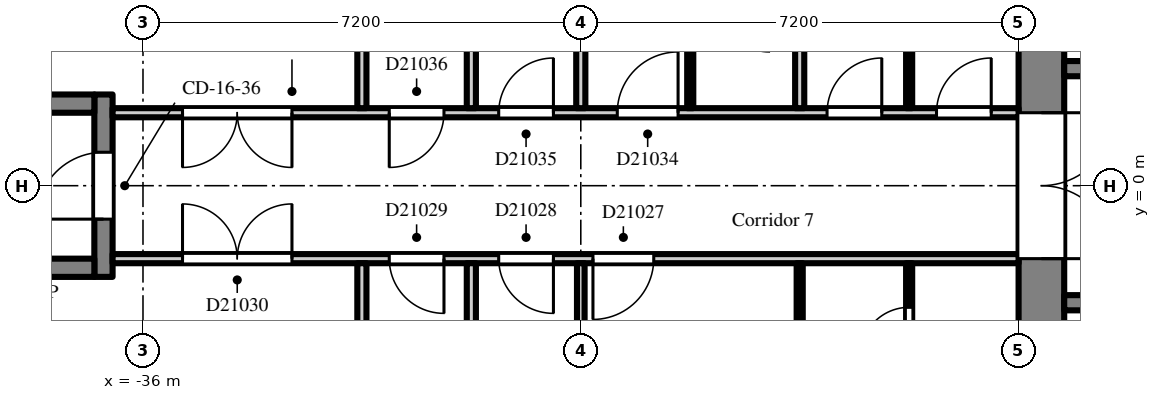
"""IFC4 building model, lengths in metres.
Left out: names, types, materials, properties, quantities, classifications, styles, units other than length and angle.
Written with IfcOpenShell. Run it as: python <this file> out.ifc"""

import sys

from ifc_helpers import new_model, si_unit, direction, frame, frame_2d, origin, place, context, subcontext, project, spatial, rectangle, extrude, element, fill, save


model = new_model("IFC4")
c1 = context("Model", 3, precision=1e-05, world=origin(), true_north=direction((0.0, 1.0)))
c2 = subcontext(c1, "Body", "Model", "MODEL_VIEW")
j1 = project(units=[si_unit("LENGTHUNIT", "METRE"), si_unit("PLANEANGLEUNIT", "RADIAN")], contexts=[c1])
p1 = place(None, origin())
s1 = spatial("IfcSite", under=j1, at=p1, CompositionType="ELEMENT")
p2 = place(p1, origin())
s2 = spatial("IfcBuilding", under=s1, at=p2, CompositionType="ELEMENT")
p3 = place(p2, frame((0.0, 0.0, 147.3)))
s3 = spatial("IfcBuildingStorey", under=s2, at=p3, CompositionType="ELEMENT", Elevation=147.3)
p4 = place(p3, frame((-21.225, -7.2, 0.0), z_axis=(0.0, 0.0, 1.0), x_axis=(0.0, 1.0, 0.0)))
e1 = element("IfcWall", 1, at=p4, inside=s3, PredefinedType="SHEAR", context=c2, shape_type="SweptSolid", body=[
    extrude(rectangle(XDim=14.4, YDim=0.75, at=frame_2d((7.2, 0.0))), origin(), (0.0, 0.0, 1.0), 2.6),
])
p5 = place(p4, frame((6.0, 0.0, 0.0)))
e2 = element("IfcOpeningElement", 2, at=p5, cuts=e1, PredefinedType="OPENING", context=c2, shape_type="SweptSolid", body=[
    extrude(rectangle(XDim=2.4, YDim=2.2, at=frame_2d((1.2, 1.1))), frame((0.0, 0.385, 0.0), z_axis=(0.0, -1.0, 0.0), x_axis=(1.0, 0.0, 0.0)), (0.0, 0.0, 1.0), 0.77),
])
p6 = place(p3, frame((-7.9, 1.925, 0.0), z_axis=(0.0, 0.0, 1.0), x_axis=(-1.0, 0.0, 0.0)))
e3 = element("IfcWall", 3, at=p6, inside=s3, PredefinedType="SHEAR", context=c2, shape_type="SweptSolid", body=[
    extrude(rectangle(XDim=12.95, YDim=0.25, at=frame_2d((6.475, 0.0))), origin(), (0.0, 0.0, 1.0), 2.6),
])
p7 = place(p6, frame((4.825, 0.0, 0.0)))
e4 = element("IfcOpeningElement", 4, at=p7, cuts=e3, PredefinedType="OPENING", context=c2, shape_type="SweptSolid", body=[
    extrude(rectangle(XDim=1.1, YDim=2.1, at=frame_2d((0.55, 1.05))), frame((0.0, 0.135, 0.0), z_axis=(0.0, -1.0, 0.0), x_axis=(1.0, 0.0, 0.0)), (0.0, 0.0, 1.0), 0.27),
])
p8 = place(p6, frame((7.025, 0.0, 0.0)))
e5 = element("IfcOpeningElement", 5, at=p8, cuts=e3, PredefinedType="OPENING", context=c2, shape_type="SweptSolid", body=[
    extrude(rectangle(XDim=1.1, YDim=2.1, at=frame_2d((0.55, 1.05))), frame((0.0, 0.135, 0.0), z_axis=(0.0, -1.0, 0.0), x_axis=(1.0, 0.0, 0.0)), (0.0, 0.0, 1.0), 0.27),
])
p9 = place(p6, frame((9.225, 0.0, 0.0)))
e6 = element("IfcOpeningElement", 6, at=p9, cuts=e3, PredefinedType="OPENING", context=c2, shape_type="SweptSolid", body=[
    extrude(rectangle(XDim=1.1, YDim=2.1, at=frame_2d((0.55, 1.05))), frame((0.0, 0.135, 0.0), z_axis=(0.0, -1.0, 0.0), x_axis=(1.0, 0.0, 0.0)), (0.0, 0.0, 1.0), 0.27),
])
p10 = place(p6, frame((0.525, 0.0, 0.0)))
e7 = element("IfcOpeningElement", 7, at=p10, cuts=e3, PredefinedType="OPENING", context=c2, shape_type="SweptSolid", body=[
    extrude(rectangle(XDim=0.9, YDim=2.1, at=frame_2d((0.45, 1.05))), frame((0.0, 0.135, 0.0), z_axis=(0.0, -1.0, 0.0), x_axis=(1.0, 0.0, 0.0)), (0.0, 0.0, 1.0), 0.27),
])
p11 = place(p6, frame((2.625, 0.0, 0.0)))
e8 = element("IfcOpeningElement", 8, at=p11, cuts=e3, PredefinedType="OPENING", context=c2, shape_type="SweptSolid", body=[
    extrude(rectangle(XDim=1.1, YDim=2.1, at=frame_2d((0.55, 1.05))), frame((0.0, 0.135, 0.0), z_axis=(0.0, -1.0, 0.0), x_axis=(1.0, 0.0, 0.0)), (0.0, 0.0, 1.0), 0.27),
])
p12 = place(p6, frame((11.525, 0.0, 0.0)))
e9 = element("IfcOpeningElement", 9, at=p12, cuts=e3, PredefinedType="OPENING", context=c2, shape_type="SweptSolid", body=[
    extrude(rectangle(XDim=0.9, YDim=2.1, at=frame_2d((0.45, 1.05))), frame((0.0, 0.135, 0.0), z_axis=(0.0, -1.0, 0.0), x_axis=(1.0, 0.0, 0.0)), (0.0, 0.0, 1.0), 0.27),
])
p13 = place(p3, frame((-7.9, -1.925, 0.0), z_axis=(0.0, 0.0, 1.0), x_axis=(-1.0, 0.0, 0.0)))
e10 = element("IfcWall", 10, at=p13, inside=s3, PredefinedType="SHEAR", context=c2, shape_type="SweptSolid", body=[
    extrude(rectangle(XDim=12.95, YDim=0.25, at=frame_2d((6.475, 0.0))), origin(), (0.0, 0.0, 1.0), 2.6),
])
p14 = place(p13, frame((0.525, 0.0, 0.0)))
e11 = element("IfcOpeningElement", 11, at=p14, cuts=e10, PredefinedType="OPENING", context=c2, shape_type="SweptSolid", body=[
    extrude(rectangle(XDim=0.9, YDim=2.1, at=frame_2d((0.45, 1.05))), frame((0.0, 0.135, 0.0), z_axis=(0.0, -1.0, 0.0), x_axis=(1.0, 0.0, 0.0)), (0.0, 0.0, 1.0), 0.27),
])
p15 = place(p13, frame((2.625, 0.0, 0.0)))
e12 = element("IfcOpeningElement", 12, at=p15, cuts=e10, PredefinedType="OPENING", context=c2, shape_type="SweptSolid", body=[
    extrude(rectangle(XDim=1.1, YDim=2.1, at=frame_2d((0.55, 1.05))), frame((0.0, 0.135, 0.0), z_axis=(0.0, -1.0, 0.0), x_axis=(1.0, 0.0, 0.0)), (0.0, 0.0, 1.0), 0.27),
])
p16 = place(p13, frame((4.925, 0.0, 0.0)))
e13 = element("IfcOpeningElement", 13, at=p16, cuts=e10, PredefinedType="OPENING", context=c2, shape_type="SweptSolid", body=[
    extrude(rectangle(XDim=0.9, YDim=2.1, at=frame_2d((0.45, 1.05))), frame((0.0, 0.135, 0.0), z_axis=(0.0, -1.0, 0.0), x_axis=(1.0, 0.0, 0.0)), (0.0, 0.0, 1.0), 0.27),
])
p17 = place(p13, frame((8.225, 0.0, 0.0)))
e14 = element("IfcOpeningElement", 14, at=p17, cuts=e10, PredefinedType="OPENING", context=c2, shape_type="SweptSolid", body=[
    extrude(rectangle(XDim=0.9, YDim=2.1, at=frame_2d((0.45, 1.05))), frame((0.0, 0.135, 0.0), z_axis=(0.0, -1.0, 0.0), x_axis=(1.0, 0.0, 0.0)), (0.0, 0.0, 1.0), 0.27),
])
p18 = place(p13, frame((11.525, 0.0, 0.0)))
e15 = element("IfcOpeningElement", 15, at=p18, cuts=e10, PredefinedType="OPENING", context=c2, shape_type="SweptSolid", body=[
    extrude(rectangle(XDim=0.9, YDim=2.1, at=frame_2d((0.45, 1.05))), frame((0.0, 0.135, 0.0), z_axis=(0.0, -1.0, 0.0), x_axis=(1.0, 0.0, 0.0)), (0.0, 0.0, 1.0), 0.27),
])
p19 = place(p3, frame((-36.65, -1.5, 0.0), z_axis=(0.0, 0.0, 1.0), x_axis=(0.0, 1.0, 0.0)))
e16 = element("IfcWall", 16, at=p19, inside=s3, PredefinedType="SHEAR", context=c2, shape_type="SweptSolid", body=[
    extrude(rectangle(XDim=3.0, YDim=0.3, at=frame_2d((1.5, 0.0))), origin(), (0.0, 0.0, 1.0), 2.6),
])
p20 = place(p19, frame((0.95, 0.0, 0.0)))
e17 = element("IfcOpeningElement", 17, at=p20, cuts=e16, PredefinedType="OPENING", context=c2, shape_type="SweptSolid", body=[
    extrude(rectangle(XDim=1.1, YDim=2.1, at=frame_2d((0.55, 1.05))), frame((0.0, 0.16, 0.0), z_axis=(0.0, -1.0, 0.0), x_axis=(1.0, 0.0, 0.0)), (0.0, 0.0, 1.0), 0.32),
])
for number, where, z_axis, x_axis in (
    (18, (-36.8, -1.35, 0.0), (0.0, 0.0, 1.0), (-1.0, 0.0, 0.0)),
    (19, (-36.8, 1.35, 0.0), (0.0, 0.0, 1.0), (-1.0, 0.0, 0.0)),
):
    element("IfcWall", number, at=place(p3, frame(where, z_axis=z_axis, x_axis=x_axis)), inside=s3, PredefinedType="SHEAR", context=c2, shape_type="SweptSolid", body=[
        extrude(rectangle(XDim=5.8, YDim=0.3, at=frame_2d((2.9, 0.0))), origin(), (0.0, 0.0, 1.0), 2.6),
    ])
p21 = place(p3, frame((-36.5, -1.2, 0.0), z_axis=(0.0, 0.0, 1.0), x_axis=(1.0, 0.0, 0.0)))
e20 = element("IfcWall", 20, at=p21, inside=s3, PredefinedType="PARTITIONING", context=c2, shape_type="SweptSolid", body=[
    extrude(rectangle(XDim=14.9, YDim=0.15, at=frame_2d((7.45, 0.0))), origin(), (0.0, 0.0, 1.0), 2.6),
])
p22 = place(p21, frame((7.9, 0.0, 0.0)))
e21 = element("IfcOpeningElement", 21, at=p22, cuts=e20, PredefinedType="OPENING", context=c2, shape_type="SweptSolid", body=[
    extrude(rectangle(XDim=1.0, YDim=2.1, at=frame_2d((0.5, 1.05))), frame((0.0, 0.085, 0.0), z_axis=(0.0, -1.0, 0.0), x_axis=(1.0, 0.0, 0.0)), (0.0, 0.0, 1.0), 0.17),
])
p23 = place(p21, frame((6.35, 0.0, 0.0)))
e22 = element("IfcOpeningElement", 22, at=p23, cuts=e20, PredefinedType="OPENING", context=c2, shape_type="SweptSolid", body=[
    extrude(rectangle(XDim=0.9, YDim=2.1, at=frame_2d((0.45, 1.05))), frame((0.0, 0.085, 0.0), z_axis=(0.0, -1.0, 0.0), x_axis=(1.0, 0.0, 0.0)), (0.0, 0.0, 1.0), 0.17),
])
p24 = place(p21, frame((4.55, 0.0, 0.0)))
e23 = element("IfcOpeningElement", 23, at=p24, cuts=e20, PredefinedType="OPENING", context=c2, shape_type="SweptSolid", body=[
    extrude(rectangle(XDim=0.9, YDim=2.1, at=frame_2d((0.45, 1.05))), frame((0.0, 0.085, 0.0), z_axis=(0.0, -1.0, 0.0), x_axis=(1.0, 0.0, 0.0)), (0.0, 0.0, 1.0), 0.17),
])
p25 = place(p21, frame((1.15, 0.0, 0.0)))
e24 = element("IfcOpeningElement", 24, at=p25, cuts=e20, PredefinedType="OPENING", context=c2, shape_type="SweptSolid", body=[
    extrude(rectangle(XDim=1.8, YDim=2.1, at=frame_2d((0.9, 1.05))), frame((0.0, 0.085, 0.0), z_axis=(0.0, -1.0, 0.0), x_axis=(1.0, 0.0, 0.0)), (0.0, 0.0, 1.0), 0.17),
])
p26 = place(p3, frame((-36.5, 1.2, 0.0), z_axis=(0.0, 0.0, 1.0), x_axis=(1.0, 0.0, 0.0)))
e25 = element("IfcWall", 25, at=p26, inside=s3, PredefinedType="PARTITIONING", context=c2, shape_type="SweptSolid", body=[
    extrude(rectangle(XDim=14.9, YDim=0.15, at=frame_2d((7.45, 0.0))), origin(), (0.0, 0.0, 1.0), 2.6),
])
p27 = place(p26, frame((13.55, 0.0, 0.0)))
e26 = element("IfcOpeningElement", 26, at=p27, cuts=e25, PredefinedType="OPENING", context=c2, shape_type="SweptSolid", body=[
    extrude(rectangle(XDim=0.9, YDim=2.1, at=frame_2d((0.45, 1.05))), frame((0.0, 0.085, 0.0), z_axis=(0.0, -1.0, 0.0), x_axis=(1.0, 0.0, 0.0)), (0.0, 0.0, 1.0), 0.17),
])
p28 = place(p26, frame((11.75, 0.0, 0.0)))
e27 = element("IfcOpeningElement", 27, at=p28, cuts=e25, PredefinedType="OPENING", context=c2, shape_type="SweptSolid", body=[
    extrude(rectangle(XDim=0.9, YDim=2.1, at=frame_2d((0.45, 1.05))), frame((0.0, 0.085, 0.0), z_axis=(0.0, -1.0, 0.0), x_axis=(1.0, 0.0, 0.0)), (0.0, 0.0, 1.0), 0.17),
])
p29 = place(p26, frame((8.3, 0.0, 0.0)))
e28 = element("IfcOpeningElement", 28, at=p29, cuts=e25, PredefinedType="OPENING", context=c2, shape_type="SweptSolid", body=[
    extrude(rectangle(XDim=1.0, YDim=2.1, at=frame_2d((0.5, 1.05))), frame((0.0, 0.085, 0.0), z_axis=(0.0, -1.0, 0.0), x_axis=(1.0, 0.0, 0.0)), (0.0, 0.0, 1.0), 0.17),
])
p30 = place(p26, frame((6.35, 0.0, 0.0)))
e29 = element("IfcOpeningElement", 29, at=p30, cuts=e25, PredefinedType="OPENING", context=c2, shape_type="SweptSolid", body=[
    extrude(rectangle(XDim=0.9, YDim=2.1, at=frame_2d((0.45, 1.05))), frame((0.0, 0.085, 0.0), z_axis=(0.0, -1.0, 0.0), x_axis=(1.0, 0.0, 0.0)), (0.0, 0.0, 1.0), 0.17),
])
p31 = place(p26, frame((4.55, 0.0, 0.0)))
e30 = element("IfcOpeningElement", 30, at=p31, cuts=e25, PredefinedType="OPENING", context=c2, shape_type="SweptSolid", body=[
    extrude(rectangle(XDim=0.9, YDim=2.1, at=frame_2d((0.45, 1.05))), frame((0.0, 0.085, 0.0), z_axis=(0.0, -1.0, 0.0), x_axis=(1.0, 0.0, 0.0)), (0.0, 0.0, 1.0), 0.17),
])
p32 = place(p26, frame((1.15, 0.0, 0.0)))
e31 = element("IfcOpeningElement", 31, at=p32, cuts=e25, PredefinedType="OPENING", context=c2, shape_type="SweptSolid", body=[
    extrude(rectangle(XDim=1.8, YDim=2.1, at=frame_2d((0.9, 1.05))), frame((0.0, 0.085, 0.0), z_axis=(0.0, -1.0, 0.0), x_axis=(1.0, 0.0, 0.0)), (0.0, 0.0, 1.0), 0.17),
])
for number, where, z_axis, x_axis in (
    (32, (-32.4, -6.9, 0.0), (0.0, 0.0, 1.0), (0.0, 1.0, 0.0)),
    (33, (-32.4, 1.275, 0.0), (0.0, 0.0, 1.0), (0.0, 1.0, 0.0)),
    (34, (-30.6, -6.9, 0.0), (0.0, 0.0, 1.0), (0.0, 1.0, 0.0)),
    (35, (-30.6, 1.275, 0.0), (0.0, 0.0, 1.0), (0.0, 1.0, 0.0)),
):
    element("IfcWall", number, at=place(p3, frame(where, z_axis=z_axis, x_axis=x_axis)), inside=s3, PredefinedType="PARTITIONING", context=c2, shape_type="SweptSolid", body=[
        extrude(rectangle(XDim=5.625, YDim=0.15, at=frame_2d((2.812, 0.0))), origin(), (0.0, 0.0, 1.0), 2.6),
    ])
p33 = place(p3, frame((-28.8, -6.9, 0.0), z_axis=(0.0, 0.0, 1.0), x_axis=(0.0, 1.0, 0.0)))
e36 = element("IfcWall", 36, at=p33, inside=s3, PredefinedType="PARTITIONING", context=c2, shape_type="SweptSolid", body=[
    extrude(rectangle(XDim=5.625, YDim=0.125, at=frame_2d((2.812, 0.0))), origin(), (0.0, 0.0, 1.0), 2.6),
])
p34 = place(p3, frame((-28.8, 1.275, 0.0), z_axis=(0.0, 0.0, 1.0), x_axis=(0.0, 1.0, 0.0)))
e37 = element("IfcWall", 37, at=p34, inside=s3, PredefinedType="PARTITIONING", context=c2, shape_type="SweptSolid", body=[
    extrude(rectangle(XDim=5.625, YDim=0.15, at=frame_2d((2.812, 0.0))), origin(), (0.0, 0.0, 1.0), 2.6),
])
p35 = place(p3, frame((-27.0, 1.275, 0.0), z_axis=(0.0, 0.0, 1.0), x_axis=(0.0, 1.0, 0.0)))
e38 = element("IfcWall", 38, at=p35, inside=s3, PredefinedType="PARTITIONING", context=c2, shape_type="SweptSolid", body=[
    extrude(rectangle(XDim=1.675, YDim=0.1, at=frame_2d((0.837, 0.0))), origin(), (0.0, 0.0, 1.0), 2.6),
])
p36 = place(p3, frame((-25.2, -3.65, 0.0), z_axis=(0.0, 0.0, 1.0), x_axis=(0.0, 1.0, 0.0)))
e39 = element("IfcWall", 39, at=p36, inside=s3, PredefinedType="PARTITIONING", context=c2, shape_type="SweptSolid", body=[
    extrude(rectangle(XDim=2.375, YDim=0.1, at=frame_2d((1.188, 0.0))), origin(), (0.0, 0.0, 1.0), 2.6),
])
p37 = place(p3, frame((-25.2, 1.275, 0.0), z_axis=(0.0, 0.0, 1.0), x_axis=(0.0, 1.0, 0.0)))
e40 = element("IfcWall", 40, at=p37, inside=s3, PredefinedType="PARTITIONING", context=c2, shape_type="SweptSolid", body=[
    extrude(rectangle(XDim=5.625, YDim=0.15, at=frame_2d((2.812, 0.0))), origin(), (0.0, 0.0, 1.0), 2.6),
])
p38 = place(p3, frame((-23.4, -3.55, 0.0), z_axis=(0.0, 0.0, 1.0), x_axis=(0.0, 1.0, 0.0)))
e41 = element("IfcWall", 41, at=p38, inside=s3, PredefinedType="PARTITIONING", context=c2, shape_type="SweptSolid", body=[
    extrude(rectangle(XDim=2.275, YDim=0.1, at=frame_2d((1.138, 0.0))), origin(), (0.0, 0.0, 1.0), 2.6),
])
p39 = place(p38, frame((0.75, 0.0, 0.0)))
e42 = element("IfcOpeningElement", 42, at=p39, cuts=e41, PredefinedType="OPENING", context=c2, shape_type="SweptSolid", body=[
    extrude(rectangle(XDim=0.8, YDim=2.1, at=frame_2d((0.4, 1.05))), frame((0.0, 0.06, 0.0), z_axis=(0.0, -1.0, 0.0), x_axis=(1.0, 0.0, 0.0)), (0.0, 0.0, 1.0), 0.12),
])
p40 = place(p3, frame((-23.4, 1.275, 0.0), z_axis=(0.0, 0.0, 1.0), x_axis=(0.0, 1.0, 0.0)))
e43 = element("IfcWall", 43, at=p40, inside=s3, PredefinedType="PARTITIONING", context=c2, shape_type="SweptSolid", body=[
    extrude(rectangle(XDim=5.625, YDim=0.1, at=frame_2d((2.812, 0.0))), origin(), (0.0, 0.0, 1.0), 2.6),
])
p41 = place(p5, frame((2.4, 0.0, 0.0), z_axis=(0.0, 0.0, 1.0), x_axis=(-1.0, 0.0, 0.0)))
e44 = element("IfcDoor", 44, at=p41, inside=s3, OperationType="DOUBLE_DOOR_DOUBLE_SWING", PredefinedType="DOOR", context=c2, shape_type="SweptSolid", body=[
    extrude(rectangle(XDim=2.4, YDim=2.2, at=frame_2d((1.2, 1.1))), frame((0.0, 0.025, 0.0), z_axis=(0.0, -1.0, 0.0), x_axis=(1.0, 0.0, 0.0)), (0.0, 0.0, 1.0), 0.05),
])
fill(e2, e44)
p42 = place(p20, origin())
e45 = element("IfcDoor", 45, at=p42, inside=s3, OperationType="SINGLE_SWING_LEFT", PredefinedType="DOOR", context=c2, shape_type="SweptSolid", body=[
    extrude(rectangle(XDim=1.1, YDim=2.1, at=frame_2d((0.55, 1.05))), frame((0.0, 0.025, 0.0), z_axis=(0.0, -1.0, 0.0), x_axis=(1.0, 0.0, 0.0)), (0.0, 0.0, 1.0), 0.05),
])
fill(e17, e45)
p43 = place(p39, origin())
e46 = element("IfcDoor", 46, at=p43, inside=s3, OperationType="SINGLE_SWING_LEFT", PredefinedType="DOOR", context=c2, shape_type="SweptSolid", body=[
    extrude(rectangle(XDim=0.8, YDim=2.1, at=frame_2d((0.4, 1.05))), frame((0.0, 0.025, 0.0), z_axis=(0.0, -1.0, 0.0), x_axis=(1.0, 0.0, 0.0)), (0.0, 0.0, 1.0), 0.05),
])
fill(e42, e46)
p44 = place(p22, frame((1.0, 0.0, 0.0), z_axis=(0.0, 0.0, 1.0), x_axis=(-1.0, 0.0, 0.0)))
e47 = element("IfcDoor", 47, at=p44, inside=s3, OperationType="SINGLE_SWING_RIGHT", PredefinedType="DOOR", context=c2, shape_type="SweptSolid", body=[
    extrude(rectangle(XDim=1.0, YDim=2.1, at=frame_2d((0.5, 1.05))), frame((0.0, 0.025, 0.0), z_axis=(0.0, -1.0, 0.0), x_axis=(1.0, 0.0, 0.0)), (0.0, 0.0, 1.0), 0.05),
])
fill(e21, e47)
p45 = place(p23, frame((0.9, 0.0, 0.0), z_axis=(0.0, 0.0, 1.0), x_axis=(-1.0, 0.0, 0.0)))
e48 = element("IfcDoor", 48, at=p45, inside=s3, OperationType="SINGLE_SWING_LEFT", PredefinedType="DOOR", context=c2, shape_type="SweptSolid", body=[
    extrude(rectangle(XDim=0.9, YDim=2.1, at=frame_2d((0.45, 1.05))), frame((0.0, 0.025, 0.0), z_axis=(0.0, -1.0, 0.0), x_axis=(1.0, 0.0, 0.0)), (0.0, 0.0, 1.0), 0.05),
])
fill(e22, e48)
p46 = place(p24, frame((0.9, 0.0, 0.0), z_axis=(0.0, 0.0, 1.0), x_axis=(-1.0, 0.0, 0.0)))
e49 = element("IfcDoor", 49, at=p46, inside=s3, OperationType="SINGLE_SWING_LEFT", PredefinedType="DOOR", context=c2, shape_type="SweptSolid", body=[
    extrude(rectangle(XDim=0.9, YDim=2.1, at=frame_2d((0.45, 1.05))), frame((0.0, 0.025, 0.0), z_axis=(0.0, -1.0, 0.0), x_axis=(1.0, 0.0, 0.0)), (0.0, 0.0, 1.0), 0.05),
])
fill(e23, e49)
p47 = place(p25, origin())
e50 = element("IfcDoor", 50, at=p47, inside=s3, OperationType="DOUBLE_DOOR_DOUBLE_SWING", PredefinedType="DOOR", context=c2, shape_type="SweptSolid", body=[
    extrude(rectangle(XDim=1.8, YDim=2.1, at=frame_2d((0.9, 1.05))), frame((0.0, 0.025, 0.0), z_axis=(0.0, -1.0, 0.0), x_axis=(1.0, 0.0, 0.0)), (0.0, 0.0, 1.0), 0.05),
])
fill(e24, e50)
p48 = place(p27, origin())
e51 = element("IfcDoor", 51, at=p48, inside=s3, OperationType="SINGLE_SWING_RIGHT", PredefinedType="DOOR", context=c2, shape_type="SweptSolid", body=[
    extrude(rectangle(XDim=0.9, YDim=2.1, at=frame_2d((0.45, 1.05))), frame((0.0, 0.025, 0.0), z_axis=(0.0, -1.0, 0.0), x_axis=(1.0, 0.0, 0.0)), (0.0, 0.0, 1.0), 0.05),
])
fill(e26, e51)
p49 = place(p28, origin())
e52 = element("IfcDoor", 52, at=p49, inside=s3, OperationType="SINGLE_SWING_RIGHT", PredefinedType="DOOR", context=c2, shape_type="SweptSolid", body=[
    extrude(rectangle(XDim=0.9, YDim=2.1, at=frame_2d((0.45, 1.05))), frame((0.0, 0.025, 0.0), z_axis=(0.0, -1.0, 0.0), x_axis=(1.0, 0.0, 0.0)), (0.0, 0.0, 1.0), 0.05),
])
fill(e27, e52)
p50 = place(p29, origin())
e53 = element("IfcDoor", 53, at=p50, inside=s3, OperationType="SINGLE_SWING_RIGHT", PredefinedType="DOOR", context=c2, shape_type="SweptSolid", body=[
    extrude(rectangle(XDim=1.0, YDim=2.1, at=frame_2d((0.5, 1.05))), frame((0.0, 0.025, 0.0), z_axis=(0.0, -1.0, 0.0), x_axis=(1.0, 0.0, 0.0)), (0.0, 0.0, 1.0), 0.05),
])
fill(e28, e53)
p51 = place(p30, origin())
e54 = element("IfcDoor", 54, at=p51, inside=s3, OperationType="SINGLE_SWING_RIGHT", PredefinedType="DOOR", context=c2, shape_type="SweptSolid", body=[
    extrude(rectangle(XDim=0.9, YDim=2.1, at=frame_2d((0.45, 1.05))), frame((0.0, 0.025, 0.0), z_axis=(0.0, -1.0, 0.0), x_axis=(1.0, 0.0, 0.0)), (0.0, 0.0, 1.0), 0.05),
])
fill(e29, e54)
p52 = place(p31, frame((0.9, 0.0, 0.0), z_axis=(0.0, 0.0, 1.0), x_axis=(-1.0, 0.0, 0.0)))
e55 = element("IfcDoor", 55, at=p52, inside=s3, OperationType="SINGLE_SWING_RIGHT", PredefinedType="DOOR", context=c2, shape_type="SweptSolid", body=[
    extrude(rectangle(XDim=0.9, YDim=2.1, at=frame_2d((0.45, 1.05))), frame((0.0, 0.025, 0.0), z_axis=(0.0, -1.0, 0.0), x_axis=(1.0, 0.0, 0.0)), (0.0, 0.0, 1.0), 0.05),
])
fill(e30, e55)
p53 = place(p32, frame((1.8, 0.0, 0.0), z_axis=(0.0, 0.0, 1.0), x_axis=(-1.0, 0.0, 0.0)))
e56 = element("IfcDoor", 56, at=p53, inside=s3, OperationType="DOUBLE_DOOR_DOUBLE_SWING", PredefinedType="DOOR", context=c2, shape_type="SweptSolid", body=[
    extrude(rectangle(XDim=1.8, YDim=2.1, at=frame_2d((0.9, 1.05))), frame((0.0, 0.025, 0.0), z_axis=(0.0, -1.0, 0.0), x_axis=(1.0, 0.0, 0.0)), (0.0, 0.0, 1.0), 0.05),
])
fill(e31, e56)
save(model, sys.argv[1])
